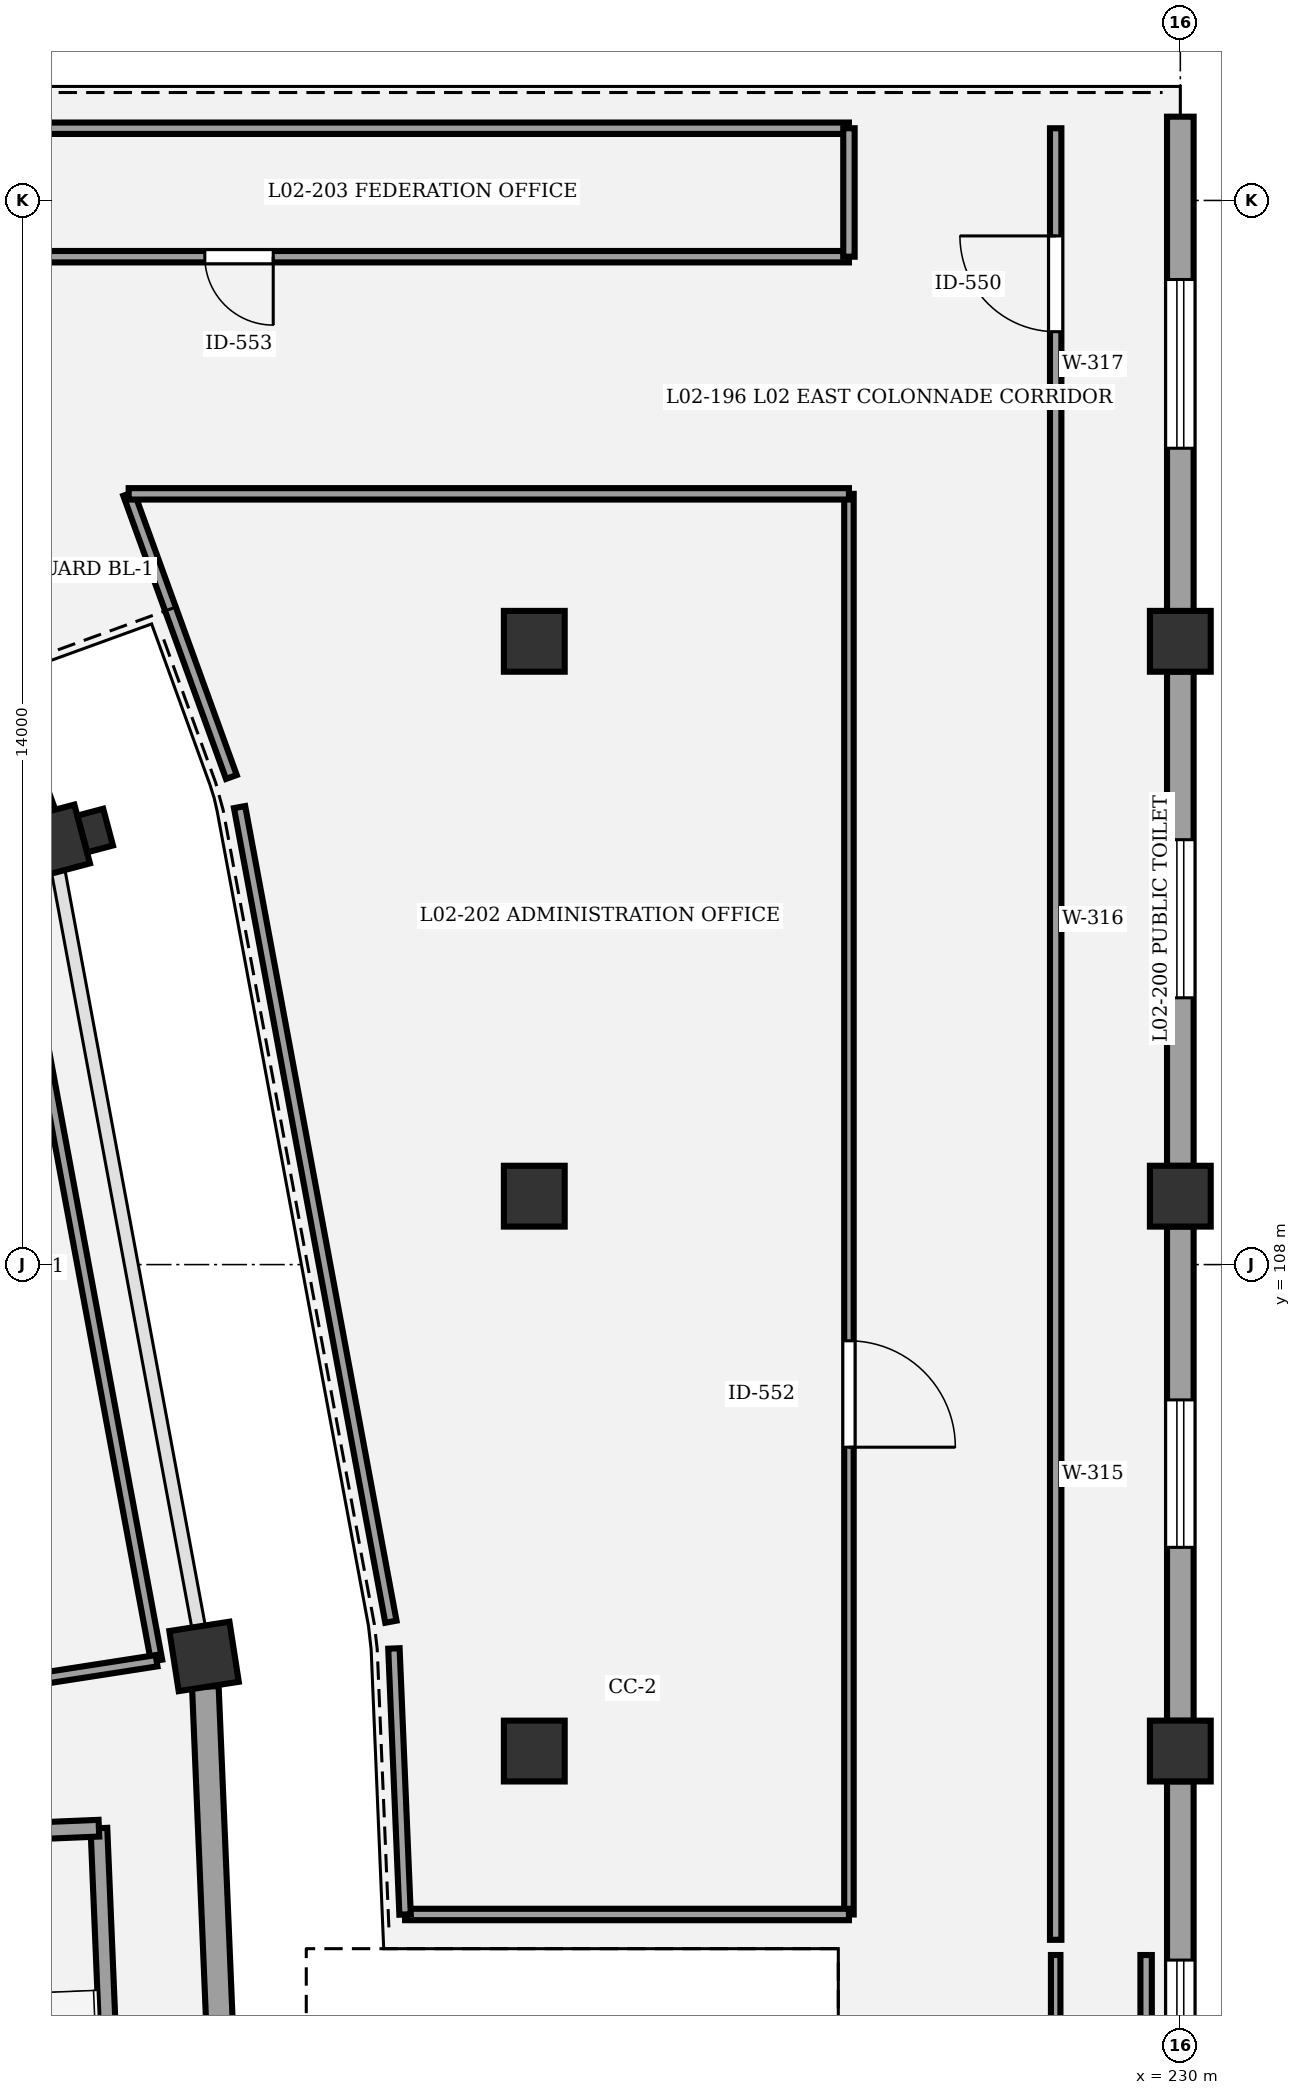
"""IFC4 building model, lengths in metres.
Left out: names, types, materials, properties, quantities, classifications, styles, units other than length and angle.
Written with IfcOpenShell. Run it as: python <this file> out.ifc"""

import sys

from ifc_helpers import new_model, si_unit, direction, frame, frame_2d, origin, origin_2d, place, context, subcontext, project, spatial, rectangle, circle, extrude, element, fill, save


model = new_model("IFC4")
c1 = context("Model", 3, precision=1e-05, world=origin(), true_north=direction((0.0, 1.0)))
c2 = subcontext(c1, "Body", "Model", "MODEL_VIEW")
j1 = project(units=[si_unit("LENGTHUNIT", "METRE"), si_unit("PLANEANGLEUNIT", "RADIAN")], contexts=[c1])
p1 = place(None, origin())
s1 = spatial("IfcSite", under=j1, at=p1, CompositionType="ELEMENT")
p2 = place(p1, origin())
s2 = spatial("IfcBuilding", under=s1, at=p2, CompositionType="ELEMENT")
p3 = place(p2, frame((0.0, 0.0, 10.2)))
s3 = spatial("IfcBuildingStorey", under=s2, at=p3, CompositionType="ELEMENT", Elevation=10.2)
for number, where, z_axis, x_axis in (
    (1, (217.156, 102.845, 0.0), (0.0, 0.0, 1.0), (0.988, 0.153, 0.0)),
    (2, (215.165, 113.562, 0.0), (0.0, 0.0, 1.0), (0.967, 0.256, 0.0)),
):
    element("IfcColumn", number, at=place(p3, frame(where, z_axis=z_axis, x_axis=x_axis)), inside=s3, PredefinedType="COLUMN", context=c2, shape_type="SweptSolid", body=[
        extrude(rectangle(XDim=0.8, YDim=0.8, at=origin_2d()), origin(), (0.0, 0.0, 1.0), 4.5),
    ])
p4 = place(p3, frame((215.723, 113.711, 0.0), z_axis=(0.0, 0.0, 1.0), x_axis=(-0.256289373133, 0.966600102017, 0.0)))
e3 = element("IfcColumn", 3, at=p4, inside=s3, PredefinedType="PILASTER", context=c2, shape_type="SweptSolid", body=[
    extrude(rectangle(XDim=0.5, YDim=0.35, at=origin_2d()), origin(), (0.0, 0.0, 1.0), 4.5),
])
for number, where, z_axis, x_axis in (
    (4, (221.5, 101.6, 0.0), (0.0, 0.0, 1.0), (1.0, 0.0, 0.0)),
    (5, (221.5, 108.9, 0.0), (0.0, 0.0, 1.0), (1.0, 0.0, 0.0)),
    (6, (221.5, 116.2, 0.0), (0.0, 0.0, 1.0), (1.0, 0.0, 0.0)),
    (7, (230.0, 101.6, 0.0), (0.0, 0.0, 1.0), (1.0, 0.0, 0.0)),
    (8, (230.0, 108.9, 0.0), (0.0, 0.0, 1.0), (1.0, 0.0, 0.0)),
    (9, (230.0, 116.2, 0.0), (0.0, 0.0, 1.0), (1.0, 0.0, 0.0)),
):
    element("IfcColumn", number, at=place(p3, frame(where, z_axis=z_axis, x_axis=x_axis)), inside=s3, PredefinedType="COLUMN", context=c2, shape_type="SweptSolid", body=[
        extrude(circle(Radius=0.4, at=origin_2d()), origin(), (0.0, 0.0, 1.0), 4.5),
    ])
p5 = place(p3, frame((217.803, 87.398, 0.0), z_axis=(0.0, 0.0, 1.0), x_axis=(-0.041898189147, 0.99912188533, 0.0)))
e10 = element("IfcWall", 10, at=p5, inside=s3, PredefinedType="STANDARD", context=c2, shape_type="SweptSolid", body=[
    extrude(rectangle(XDim=15.063, YDim=0.35, at=frame_2d((7.531, 0.0))), origin(), (0.0, 0.0, 1.0), 3.42),
])
p6 = place(p5, frame((6.351, 0.0, 0.9)))
e11 = element("IfcOpeningElement", 11, at=p6, cuts=e10, PredefinedType="OPENING", context=c2, shape_type="SweptSolid", body=[
    extrude(rectangle(XDim=2.36, YDim=1.75, at=frame_2d((1.18, 0.875))), frame((0.0, 0.185, 0.0), z_axis=(0.0, -1.0, 0.0), x_axis=(1.0, 0.0, 0.0)), (0.0, 0.0, 1.0), 0.37),
])
p7 = place(p3, frame((211.992, 122.308, 0.0), z_axis=(0.0, 0.0, 1.0), x_axis=(0.34103858998, -0.940049296657, 0.0)))
e12 = element("IfcWall", 12, at=p7, inside=s3, PredefinedType="STANDARD", context=c2, shape_type="SweptSolid", body=[
    extrude(rectangle(XDim=8.906, YDim=0.35, at=frame_2d((4.453, 0.0))), origin(), (0.0, 0.0, 1.0), 3.42),
])
p8 = place(p7, frame((3.553, 0.0, 0.0)))
e13 = element("IfcOpeningElement", 13, at=p8, cuts=e12, PredefinedType="OPENING", context=c2, shape_type="SweptSolid", body=[
    extrude(rectangle(XDim=1.8, YDim=2.4, at=frame_2d((0.9, 1.2))), frame((0.0, 0.185, 0.0), z_axis=(0.0, -1.0, 0.0), x_axis=(1.0, 0.0, 0.0)), (0.0, 0.0, 1.0), 0.37),
])
p9 = place(p3, frame((230.0, 101.202, 0.0), z_axis=(0.0, 0.0, 1.0), x_axis=(0.0, -1.0, 0.0)))
e14 = element("IfcWall", 14, at=p9, inside=s3, PredefinedType="STANDARD", context=c2, shape_type="SweptSolid", body=[
    extrude(rectangle(XDim=6.504, YDim=0.35, at=frame_2d((3.252, 0.0))), origin(), (0.0, 0.0, 1.0), 3.26),
])
p10 = place(p9, frame((2.352, 0.0, 0.9)))
e15 = element("IfcOpeningElement", 15, at=p10, cuts=e14, PredefinedType="OPENING", context=c2, shape_type="SweptSolid", body=[
    extrude(rectangle(XDim=1.8, YDim=1.55, at=frame_2d((0.9, 0.775))), frame((0.0, 0.185, 0.0), z_axis=(0.0, -1.0, 0.0), x_axis=(1.0, 0.0, 0.0)), (0.0, 0.0, 1.0), 0.37),
])
p11 = place(p3, frame((230.0, 108.502, 0.0), z_axis=(0.0, 0.0, 1.0), x_axis=(0.0, -1.0, 0.0)))
e16 = element("IfcWall", 16, at=p11, inside=s3, PredefinedType="STANDARD", context=c2, shape_type="SweptSolid", body=[
    extrude(rectangle(XDim=6.504, YDim=0.35, at=frame_2d((3.252, 0.0))), origin(), (0.0, 0.0, 1.0), 3.26),
])
p12 = place(p11, frame((2.282, 0.0, 0.9)))
e17 = element("IfcOpeningElement", 17, at=p12, cuts=e16, PredefinedType="OPENING", context=c2, shape_type="SweptSolid", body=[
    extrude(rectangle(XDim=1.94, YDim=1.55, at=frame_2d((0.97, 0.775))), frame((0.0, 0.185, 0.0), z_axis=(0.0, -1.0, 0.0), x_axis=(1.0, 0.0, 0.0)), (0.0, 0.0, 1.0), 0.37),
])
p13 = place(p3, frame((230.0, 115.802, 0.0), z_axis=(0.0, 0.0, 1.0), x_axis=(0.0, -1.0, 0.0)))
e18 = element("IfcWall", 18, at=p13, inside=s3, PredefinedType="STANDARD", context=c2, shape_type="SweptSolid", body=[
    extrude(rectangle(XDim=6.504, YDim=0.35, at=frame_2d((3.252, 0.0))), origin(), (0.0, 0.0, 1.0), 3.26),
])
p14 = place(p13, frame((2.212, 0.0, 0.9)))
e19 = element("IfcOpeningElement", 19, at=p14, cuts=e18, PredefinedType="OPENING", context=c2, shape_type="SweptSolid", body=[
    extrude(rectangle(XDim=2.08, YDim=1.55, at=frame_2d((1.04, 0.775))), frame((0.0, 0.185, 0.0), z_axis=(0.0, -1.0, 0.0), x_axis=(1.0, 0.0, 0.0)), (0.0, 0.0, 1.0), 0.37),
])
p15 = place(p3, frame((230.0, 123.102, 0.0), z_axis=(0.0, 0.0, 1.0), x_axis=(0.0, -1.0, 0.0)))
e20 = element("IfcWall", 20, at=p15, inside=s3, PredefinedType="STANDARD", context=c2, shape_type="SweptSolid", body=[
    extrude(rectangle(XDim=6.504, YDim=0.35, at=frame_2d((3.252, 0.0))), origin(), (0.0, 0.0, 1.0), 3.26),
])
p16 = place(p15, frame((2.142, 0.0, 0.9)))
e21 = element("IfcOpeningElement", 21, at=p16, cuts=e20, PredefinedType="OPENING", context=c2, shape_type="SweptSolid", body=[
    extrude(rectangle(XDim=2.22, YDim=1.55, at=frame_2d((1.11, 0.775))), frame((0.0, 0.185, 0.0), z_axis=(0.0, -1.0, 0.0), x_axis=(1.0, 0.0, 0.0)), (0.0, 0.0, 1.0), 0.37),
])
p17 = place(p3, frame((215.772, 100.585, 0.0), z_axis=(0.0, 0.0, 1.0), x_axis=(0.041871977473, -0.999122984173, 0.0)))
e22 = element("IfcWall", 22, at=p17, inside=s3, PredefinedType="SHEAR", context=c2, shape_type="SweptSolid", body=[
    extrude(rectangle(XDim=11.02, YDim=0.22, at=frame_2d((5.51, 0.0))), origin(), (0.0, 0.0, 1.0), 4.25),
])
p18 = place(p3, frame((211.365, 100.4, 0.0), z_axis=(0.0, 0.0, 1.0), x_axis=(0.999121521721, 0.041906859039, 0.0)))
e23 = element("IfcWall", 23, at=p18, inside=s3, PredefinedType="SHEAR", context=c2, shape_type="SweptSolid", body=[
    extrude(rectangle(XDim=4.41, YDim=0.22, at=frame_2d((2.205, 0.0))), origin(), (0.0, 0.0, 1.0), 4.25),
])
p19 = place(p3, frame((228.36, 75.083, 0.0), z_axis=(0.0, 0.0, 1.0), x_axis=(0.0, 1.0, 0.0)))
e24 = element("IfcWall", 24, at=p19, inside=s3, PredefinedType="PARTITIONING", context=c2, shape_type="SweptSolid", body=[
    extrude(rectangle(XDim=23.833, YDim=0.125, at=frame_2d((11.917, 0.0))), origin(), (0.0, 0.0, 1.0), 3.25),
])
p20 = place(p19, frame((8.011, 0.0, 0.0)))
e25 = element("IfcOpeningElement", 25, at=p20, cuts=e24, PredefinedType="OPENING", context=c2, shape_type="SweptSolid", body=[
    extrude(rectangle(XDim=1.22, YDim=2.1, at=frame_2d((0.61, 1.05))), frame((0.0, 0.073, 0.0), z_axis=(0.0, -1.0, 0.0), x_axis=(1.0, 0.0, 0.0)), (0.0, 0.0, 1.0), 0.145),
])
p21 = place(p3, frame((228.36, 99.117, 0.0), z_axis=(0.0, 0.0, 1.0), x_axis=(0.0, 1.0, 0.0)))
e26 = element("IfcWall", 26, at=p21, inside=s3, PredefinedType="PARTITIONING", context=c2, shape_type="SweptSolid", body=[
    extrude(rectangle(XDim=23.833, YDim=0.15, at=frame_2d((11.917, 0.0))), origin(), (0.0, 0.0, 1.0), 3.25),
])
p22 = place(p21, frame((21.156, 0.0, 0.0)))
e27 = element("IfcOpeningElement", 27, at=p22, cuts=e26, PredefinedType="OPENING", context=c2, shape_type="SweptSolid", body=[
    extrude(rectangle(XDim=1.26, YDim=2.1, at=frame_2d((0.63, 1.05))), frame((0.0, 0.085, 0.0), z_axis=(0.0, -1.0, 0.0), x_axis=(1.0, 0.0, 0.0)), (0.0, 0.0, 1.0), 0.17),
])
p23 = place(p3, frame((225.64, 118.14, 0.0), z_axis=(0.0, 0.0, 1.0), x_axis=(0.0, -1.0, 0.0)))
e28 = element("IfcWall", 28, at=p23, inside=s3, PredefinedType="PARTITIONING", context=c2, shape_type="SweptSolid", body=[
    extrude(rectangle(XDim=18.69, YDim=0.125, at=frame_2d((9.345, 0.0))), origin(), (0.0, 0.0, 1.0), 3.25),
])
p24 = place(p23, frame((11.143, 0.0, 0.0)))
e29 = element("IfcOpeningElement", 29, at=p24, cuts=e28, PredefinedType="OPENING", context=c2, shape_type="SweptSolid", body=[
    extrude(rectangle(XDim=1.4, YDim=2.1, at=frame_2d((0.7, 1.05))), frame((0.0, 0.073, 0.0), z_axis=(0.0, -1.0, 0.0), x_axis=(1.0, 0.0, 0.0)), (0.0, 0.0, 1.0), 0.145),
])
p25 = place(p3, frame((225.64, 121.26, 0.0), z_axis=(0.0, 0.0, 1.0), x_axis=(-1.0, 0.0, 0.0)))
e30 = element("IfcWall", 30, at=p25, inside=s3, PredefinedType="PARTITIONING", context=c2, shape_type="SweptSolid", body=[
    extrude(rectangle(XDim=10.608, YDim=0.15, at=frame_2d((5.304, 0.0))), origin(), (0.0, 0.0, 1.0), 3.25),
])
p26 = place(p25, frame((7.575, 0.0, 0.0)))
e31 = element("IfcOpeningElement", 31, at=p26, cuts=e30, PredefinedType="OPENING", context=c2, shape_type="SweptSolid", body=[
    extrude(rectangle(XDim=0.9, YDim=2.2, at=frame_2d((0.45, 1.1))), frame((0.0, 0.085, 0.0), z_axis=(0.0, -1.0, 0.0), x_axis=(1.0, 0.0, 0.0)), (0.0, 0.0, 1.0), 0.17),
])
p27 = place(p3, frame((214.566, 113.362, 0.0), z_axis=(0.0, 0.0, 1.0), x_axis=(0.182607868301, -0.983185824976, 0.0)))
e32 = element("IfcWall", 32, at=p27, inside=s3, PredefinedType="PARTITIONING", context=c2, shape_type="SweptSolid", body=[
    extrude(rectangle(XDim=10.755, YDim=0.15, at=frame_2d((5.377, 0.0))), origin(), (0.0, 0.0, 1.0), 3.25),
])
p28 = place(p3, frame((216.53, 102.789, 0.0), z_axis=(0.0, 0.0, 1.0), x_axis=(-0.988185582016, -0.153262048451, 0.0)))
e33 = element("IfcWall", 33, at=p28, inside=s3, PredefinedType="PARTITIONING", context=c2, shape_type="SweptSolid", body=[
    extrude(rectangle(XDim=7.917, YDim=0.15, at=frame_2d((3.958, 0.0))), origin(), (0.0, 0.0, 1.0), 3.25),
])
p29 = place(p3, frame((229.55, 98.917, 0.0), z_axis=(0.0, 0.0, 1.0), x_axis=(0.0, -1.0, 0.0)))
e34 = element("IfcWall", 34, at=p29, inside=s3, PredefinedType="PARTITIONING", context=c2, shape_type="SweptSolid", body=[
    extrude(rectangle(XDim=23.833, YDim=0.15, at=frame_2d((11.917, 0.0))), origin(), (0.0, 0.0, 1.0), 3.25),
])
p30 = place(p3, frame((219.613, 103.302, 0.0), z_axis=(0.0, 0.0, 1.0), x_axis=(-0.182620957058, 0.983183393901, 0.0)))
e35 = element("IfcWall", 35, at=p30, inside=s3, PredefinedType="PARTITIONING", context=c2, shape_type="SweptSolid", body=[
    extrude(rectangle(XDim=10.901, YDim=0.15, at=frame_2d((5.45, 0.0))), origin(), (0.0, 0.0, 1.0), 3.25),
])
p31 = place(p3, frame((217.515, 114.415, 0.0), z_axis=(0.0, 0.0, 1.0), x_axis=(-0.341035525383, 0.94005040845, 0.0)))
e36 = element("IfcWall", 36, at=p31, inside=s3, PredefinedType="PARTITIONING", context=c2, shape_type="SweptSolid", body=[
    extrude(rectangle(XDim=3.962, YDim=0.15, at=frame_2d((1.981, 0.0))), origin(), (0.0, 0.0, 1.0), 3.25),
])
p32 = place(p3, frame((216.163, 118.14, 0.0), z_axis=(0.0, 0.0, 1.0), x_axis=(1.0, 0.0, 0.0)))
e37 = element("IfcWall", 37, at=p32, inside=s3, PredefinedType="PARTITIONING", context=c2, shape_type="SweptSolid", body=[
    extrude(rectangle(XDim=9.477, YDim=0.15, at=frame_2d((4.738, 0.0))), origin(), (0.0, 0.0, 1.0), 3.25),
])
p33 = place(p3, frame((225.64, 99.45, 0.0), z_axis=(0.0, 0.0, 1.0), x_axis=(-1.0, 0.0, 0.0)))
e38 = element("IfcWall", 38, at=p33, inside=s3, PredefinedType="PARTITIONING", context=c2, shape_type="SweptSolid", body=[
    extrude(rectangle(XDim=5.84, YDim=0.15, at=frame_2d((2.92, 0.0))), origin(), (0.0, 0.0, 1.0), 3.25),
])
p34 = place(p3, frame((219.8, 99.45, 0.0), z_axis=(0.0, 0.0, 1.0), x_axis=(-0.041888559174, 0.999122289117, 0.0)))
e39 = element("IfcWall", 39, at=p34, inside=s3, PredefinedType="PARTITIONING", context=c2, shape_type="SweptSolid", body=[
    extrude(rectangle(XDim=3.503, YDim=0.15, at=frame_2d((1.751, 0.0))), origin(), (0.0, 0.0, 1.0), 3.25),
])
p35 = place(p3, frame((214.418, 122.95, 0.0), z_axis=(0.0, 0.0, 1.0), x_axis=(1.0, 0.0, 0.0)))
e40 = element("IfcWall", 40, at=p35, inside=s3, PredefinedType="PARTITIONING", context=c2, shape_type="SweptSolid", body=[
    extrude(rectangle(XDim=11.221, YDim=0.15, at=frame_2d((5.611, 0.0))), origin(), (0.0, 0.0, 1.0), 3.25),
])
p36 = place(p3, frame((225.64, 122.95, 0.0), z_axis=(0.0, 0.0, 1.0), x_axis=(0.0, -1.0, 0.0)))
e41 = element("IfcWall", 41, at=p36, inside=s3, PredefinedType="PARTITIONING", context=c2, shape_type="SweptSolid", body=[
    extrude(rectangle(XDim=1.69, YDim=0.15, at=frame_2d((0.845, 0.0))), origin(), (0.0, 0.0, 1.0), 3.25),
])
p37 = place(p10, origin())
e42 = element("IfcWindow", 42, at=p37, inside=s3, PartitioningType="SINGLE_PANEL", PredefinedType="WINDOW", context=c2, shape_type="SweptSolid", body=[
    extrude(rectangle(XDim=1.8, YDim=1.55, at=frame_2d((0.9, 0.775))), frame((0.0, 0.03, 0.0), z_axis=(0.0, -1.0, 0.0), x_axis=(1.0, 0.0, 0.0)), (0.0, 0.0, 1.0), 0.06),
])
fill(e15, e42)
p38 = place(p12, origin())
e43 = element("IfcWindow", 43, at=p38, inside=s3, PartitioningType="SINGLE_PANEL", PredefinedType="WINDOW", context=c2, shape_type="SweptSolid", body=[
    extrude(rectangle(XDim=1.94, YDim=1.55, at=frame_2d((0.97, 0.775))), frame((0.0, 0.03, 0.0), z_axis=(0.0, -1.0, 0.0), x_axis=(1.0, 0.0, 0.0)), (0.0, 0.0, 1.0), 0.06),
])
fill(e17, e43)
p39 = place(p14, origin())
e44 = element("IfcWindow", 44, at=p39, inside=s3, PartitioningType="SINGLE_PANEL", PredefinedType="WINDOW", context=c2, shape_type="SweptSolid", body=[
    extrude(rectangle(XDim=2.08, YDim=1.55, at=frame_2d((1.04, 0.775))), frame((0.0, 0.03, 0.0), z_axis=(0.0, -1.0, 0.0), x_axis=(1.0, 0.0, 0.0)), (0.0, 0.0, 1.0), 0.06),
])
fill(e19, e44)
p40 = place(p16, origin())
e45 = element("IfcWindow", 45, at=p40, inside=s3, PartitioningType="SINGLE_PANEL", PredefinedType="WINDOW", context=c2, shape_type="SweptSolid", body=[
    extrude(rectangle(XDim=2.22, YDim=1.55, at=frame_2d((1.11, 0.775))), frame((0.0, 0.03, 0.0), z_axis=(0.0, -1.0, 0.0), x_axis=(1.0, 0.0, 0.0)), (0.0, 0.0, 1.0), 0.06),
])
fill(e21, e45)
p41 = place(p22, origin())
e46 = element("IfcDoor", 46, at=p41, inside=s3, OperationType="SINGLE_SWING_RIGHT", PredefinedType="DOOR", context=c2, shape_type="SweptSolid", body=[
    extrude(rectangle(XDim=1.26, YDim=2.1, at=frame_2d((0.63, 1.05))), frame((0.0, 0.025, 0.0), z_axis=(0.0, -1.0, 0.0), x_axis=(1.0, 0.0, 0.0)), (0.0, 0.0, 1.0), 0.05),
])
fill(e27, e46)
p42 = place(p24, origin())
e47 = element("IfcDoor", 47, at=p42, inside=s3, OperationType="SINGLE_SWING_RIGHT", PredefinedType="DOOR", context=c2, shape_type="SweptSolid", body=[
    extrude(rectangle(XDim=1.4, YDim=2.1, at=frame_2d((0.7, 1.05))), frame((0.0, 0.025, 0.0), z_axis=(0.0, -1.0, 0.0), x_axis=(1.0, 0.0, 0.0)), (0.0, 0.0, 1.0), 0.05),
])
fill(e29, e47)
p43 = place(p26, origin())
e48 = element("IfcDoor", 48, at=p43, inside=s3, OperationType="SINGLE_SWING_LEFT", PredefinedType="DOOR", context=c2, shape_type="SweptSolid", body=[
    extrude(rectangle(XDim=0.9, YDim=2.2, at=frame_2d((0.45, 1.1))), frame((0.0, 0.025, 0.0), z_axis=(0.0, -1.0, 0.0), x_axis=(1.0, 0.0, 0.0)), (0.0, 0.0, 1.0), 0.05),
])
fill(e31, e48)
save(model, sys.argv[1])
